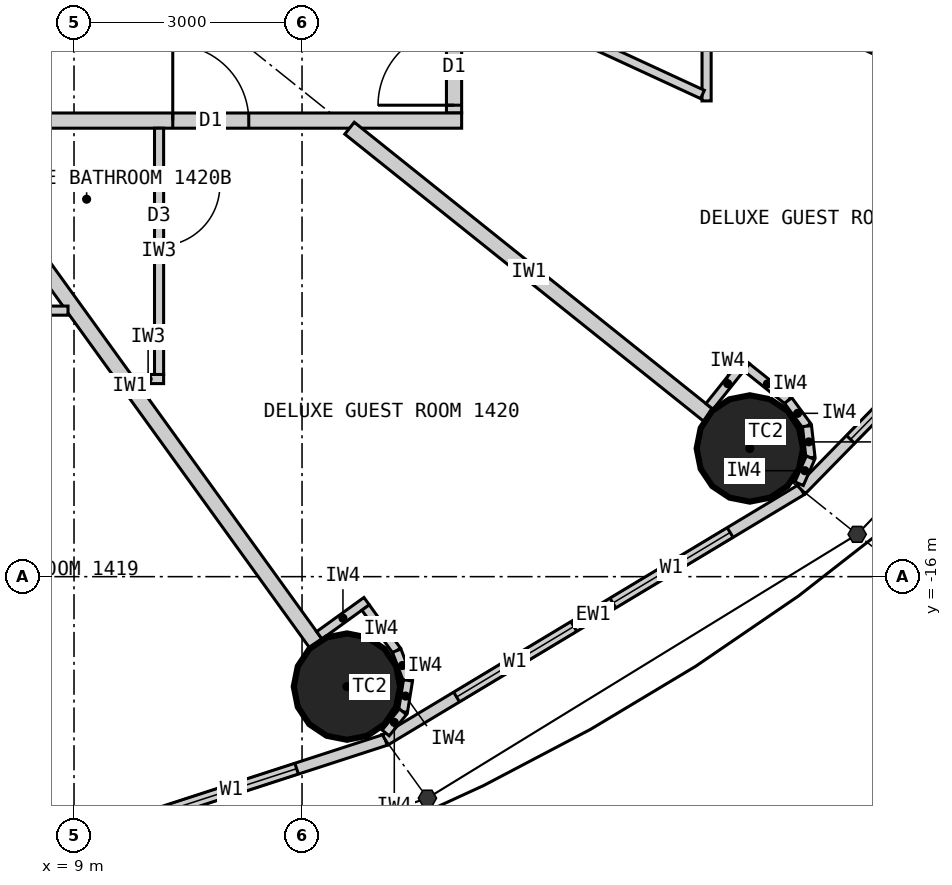
"""IFC4 building model, lengths in metres.
Left out: names, types, materials, properties, quantities, classifications, styles, units other than length and angle.
Written with IfcOpenShell. Run it as: python <this file> out.ifc"""

import sys

from ifc_helpers import new_model, si_unit, direction, frame, frame_2d, origin, origin_2d, place, context, subcontext, project, spatial, rectangle, circle, extrude, element, fill, save


model = new_model("IFC4")
c1 = context("Model", 3, precision=1e-05, world=origin(), true_north=direction((0.0, 1.0)))
c2 = subcontext(c1, "Body", "Model", "MODEL_VIEW")
j1 = project(units=[si_unit("LENGTHUNIT", "METRE"), si_unit("PLANEANGLEUNIT", "RADIAN")], contexts=[c1])
p1 = place(None, origin())
s1 = spatial("IfcSite", under=j1, at=p1, CompositionType="ELEMENT")
p2 = place(p1, origin())
s2 = spatial("IfcBuilding", under=s1, at=p2, CompositionType="ELEMENT")
p3 = place(p2, frame((0.0, 0.0, 60.6)))
s3 = spatial("IfcBuildingStorey", under=s2, at=p3, CompositionType="ELEMENT", Elevation=60.6)
for number, where, z_axis, x_axis in (
    (1, (12.591, -17.447, 0.0), (0.0, 0.0, 1.0), (1.0, 0.0, 0.0)),
    (2, (17.892, -14.313, 0.0), (0.0, 0.0, 1.0), (1.0, 0.0, 0.0)),
):
    element("IfcColumn", number, at=place(p3, frame(where, z_axis=z_axis, x_axis=x_axis)), inside=s3, PredefinedType="COLUMN", context=c2, shape_type="SweptSolid", body=[
        extrude(circle(Radius=0.7, at=origin_2d()), origin(), (0.0, 0.0, 1.0), 3.3),
    ])
p4 = place(p3, frame((6.766, -20.202, 0.0), z_axis=(0.0, 0.0, 1.0), x_axis=(0.951137534625, 0.308767534285, 0.0)))
e3 = element("IfcWall", 3, at=p4, inside=s3, PredefinedType="ELEMENTEDWALL", context=c2, shape_type="SweptSolid", body=[
    extrude(rectangle(XDim=6.655, YDim=0.15, at=frame_2d((3.328, 0.0))), origin(), (0.0, 0.0, 1.0), 3.12),
])
p5 = place(p4, frame((1.228, 0.0, 0.9)))
e4 = element("IfcOpeningElement", 4, at=p5, cuts=e3, PredefinedType="OPENING", context=c2, shape_type="SweptSolid", body=[
    extrude(rectangle(XDim=1.8, YDim=1.9, at=frame_2d((0.9, 0.95))), frame((0.0, 0.085, 0.0), z_axis=(0.0, -1.0, 0.0), x_axis=(1.0, 0.0, 0.0)), (0.0, 0.0, 1.0), 0.17),
])
p6 = place(p4, frame((3.628, 0.0, 0.9)))
e5 = element("IfcOpeningElement", 5, at=p6, cuts=e3, PredefinedType="OPENING", context=c2, shape_type="SweptSolid", body=[
    extrude(rectangle(XDim=1.8, YDim=1.9, at=frame_2d((0.9, 0.95))), frame((0.0, 0.085, 0.0), z_axis=(0.0, -1.0, 0.0), x_axis=(1.0, 0.0, 0.0)), (0.0, 0.0, 1.0), 0.17),
])
p7 = place(p3, frame((13.096, -18.147, 0.0), z_axis=(0.0, 0.0, 1.0), x_axis=(0.856983180864, 0.515344377787, 0.0)))
e6 = element("IfcWall", 6, at=p7, inside=s3, PredefinedType="ELEMENTEDWALL", context=c2, shape_type="SweptSolid", body=[
    extrude(rectangle(XDim=6.386, YDim=0.15, at=frame_2d((3.193, 0.0))), origin(), (0.0, 0.0, 1.0), 3.12),
])
p8 = place(p7, frame((1.093, 0.0, 0.9)))
e7 = element("IfcOpeningElement", 7, at=p8, cuts=e6, PredefinedType="OPENING", context=c2, shape_type="SweptSolid", body=[
    extrude(rectangle(XDim=1.8, YDim=1.9, at=frame_2d((0.9, 0.95))), frame((0.0, 0.085, 0.0), z_axis=(0.0, -1.0, 0.0), x_axis=(1.0, 0.0, 0.0)), (0.0, 0.0, 1.0), 0.17),
])
p9 = place(p7, frame((3.493, 0.0, 0.9)))
e8 = element("IfcOpeningElement", 8, at=p9, cuts=e6, PredefinedType="OPENING", context=c2, shape_type="SweptSolid", body=[
    extrude(rectangle(XDim=1.8, YDim=1.9, at=frame_2d((0.9, 0.95))), frame((0.0, 0.085, 0.0), z_axis=(0.0, -1.0, 0.0), x_axis=(1.0, 0.0, 0.0)), (0.0, 0.0, 1.0), 0.17),
])
p10 = place(p3, frame((18.57, -14.856, 0.0), z_axis=(0.0, 0.0, 1.0), x_axis=(0.699602905915, 0.714531856557, 0.0)))
e9 = element("IfcWall", 9, at=p10, inside=s3, PredefinedType="ELEMENTEDWALL", context=c2, shape_type="SweptSolid", body=[
    extrude(rectangle(XDim=6.051, YDim=0.15, at=frame_2d((3.025, 0.0))), origin(), (0.0, 0.0, 1.0), 3.12),
])
p11 = place(p10, frame((0.926, 0.0, 0.9)))
e10 = element("IfcOpeningElement", 10, at=p11, cuts=e9, PredefinedType="OPENING", context=c2, shape_type="SweptSolid", body=[
    extrude(rectangle(XDim=1.8, YDim=1.9, at=frame_2d((0.9, 0.95))), frame((0.0, 0.085, 0.0), z_axis=(0.0, -1.0, 0.0), x_axis=(1.0, 0.0, 0.0)), (0.0, 0.0, 1.0), 0.17),
])
p12 = place(p10, frame((3.325, 0.0, 0.9)))
e11 = element("IfcOpeningElement", 11, at=p12, cuts=e9, PredefinedType="OPENING", context=c2, shape_type="SweptSolid", body=[
    extrude(rectangle(XDim=1.8, YDim=1.9, at=frame_2d((0.9, 0.95))), frame((0.0, 0.085, 0.0), z_axis=(0.0, -1.0, 0.0), x_axis=(1.0, 0.0, 0.0)), (0.0, 0.0, 1.0), 0.17),
])
p13 = place(p3, frame((14.0, -9.9, 0.0), z_axis=(0.0, 0.0, 1.0), x_axis=(0.0, 1.0, 0.0)))
e12 = element("IfcWall", 12, at=p13, inside=s3, PredefinedType="PARTITIONING", context=c2, shape_type="SweptSolid", body=[
    extrude(rectangle(XDim=19.8, YDim=0.2, at=frame_2d((9.9, 0.0))), origin(), (0.0, 0.0, 1.0), 3.12),
])
p14 = place(p13, frame((0.103, 0.0, 0.0)))
e13 = element("IfcOpeningElement", 13, at=p14, cuts=e12, PredefinedType="OPENING", context=c2, shape_type="SweptSolid", body=[
    extrude(rectangle(XDim=1.0, YDim=2.2, at=frame_2d((0.5, 1.1))), frame((0.0, 0.11, 0.0), z_axis=(0.0, -1.0, 0.0), x_axis=(1.0, 0.0, 0.0)), (0.0, 0.0, 1.0), 0.22),
])
p15 = place(p13, frame((5.248, 0.0, 0.0)))
e14 = element("IfcOpeningElement", 14, at=p15, cuts=e12, PredefinedType="OPENING", context=c2, shape_type="SweptSolid", body=[
    extrude(rectangle(XDim=1.0, YDim=2.2, at=frame_2d((0.5, 1.1))), frame((0.0, 0.11, 0.0), z_axis=(0.0, -1.0, 0.0), x_axis=(1.0, 0.0, 0.0)), (0.0, 0.0, 1.0), 0.22),
])
p16 = place(p13, frame((8.438, 0.0, 0.0)))
e15 = element("IfcOpeningElement", 15, at=p16, cuts=e12, PredefinedType="OPENING", context=c2, shape_type="SweptSolid", body=[
    extrude(rectangle(XDim=1.0, YDim=2.2, at=frame_2d((0.5, 1.1))), frame((0.0, 0.11, 0.0), z_axis=(0.0, -1.0, 0.0), x_axis=(1.0, 0.0, 0.0)), (0.0, 0.0, 1.0), 0.22),
])
p17 = place(p13, frame((14.532, 0.0, 0.0)))
e16 = element("IfcOpeningElement", 16, at=p17, cuts=e12, PredefinedType="OPENING", context=c2, shape_type="SweptSolid", body=[
    extrude(rectangle(XDim=1.0, YDim=2.2, at=frame_2d((0.5, 1.1))), frame((0.0, 0.11, 0.0), z_axis=(0.0, -1.0, 0.0), x_axis=(1.0, 0.0, 0.0)), (0.0, 0.0, 1.0), 0.22),
])
p18 = place(p3, frame((14.1, -10.0, 0.0), z_axis=(0.0, 0.0, 1.0), x_axis=(-1.0, 0.0, 0.0)))
e17 = element("IfcWall", 17, at=p18, inside=s3, PredefinedType="PARTITIONING", context=c2, shape_type="SweptSolid", body=[
    extrude(rectangle(XDim=28.2, YDim=0.2, at=frame_2d((14.1, 0.0))), origin(), (0.0, 0.0, 1.0), 3.12),
])
p19 = place(p18, frame((23.865, 0.0, 0.0)))
e18 = element("IfcOpeningElement", 18, at=p19, cuts=e17, PredefinedType="OPENING", context=c2, shape_type="SweptSolid", body=[
    extrude(rectangle(XDim=1.0, YDim=2.2, at=frame_2d((0.5, 1.1))), frame((0.0, 0.11, 0.0), z_axis=(0.0, -1.0, 0.0), x_axis=(1.0, 0.0, 0.0)), (0.0, 0.0, 1.0), 0.22),
])
p20 = place(p18, frame((18.529, 0.0, 0.0)))
e19 = element("IfcOpeningElement", 19, at=p20, cuts=e17, PredefinedType="OPENING", context=c2, shape_type="SweptSolid", body=[
    extrude(rectangle(XDim=1.0, YDim=2.2, at=frame_2d((0.5, 1.1))), frame((0.0, 0.11, 0.0), z_axis=(0.0, -1.0, 0.0), x_axis=(1.0, 0.0, 0.0)), (0.0, 0.0, 1.0), 0.22),
])
p21 = place(p18, frame((14.623, 0.0, 0.0)))
e20 = element("IfcOpeningElement", 20, at=p21, cuts=e17, PredefinedType="OPENING", context=c2, shape_type="SweptSolid", body=[
    extrude(rectangle(XDim=1.0, YDim=2.2, at=frame_2d((0.5, 1.1))), frame((0.0, 0.11, 0.0), z_axis=(0.0, -1.0, 0.0), x_axis=(1.0, 0.0, 0.0)), (0.0, 0.0, 1.0), 0.22),
])
p22 = place(p18, frame((11.24, 0.0, 0.0)))
e21 = element("IfcOpeningElement", 21, at=p22, cuts=e17, PredefinedType="OPENING", context=c2, shape_type="SweptSolid", body=[
    extrude(rectangle(XDim=1.0, YDim=2.2, at=frame_2d((0.5, 1.1))), frame((0.0, 0.11, 0.0), z_axis=(0.0, -1.0, 0.0), x_axis=(1.0, 0.0, 0.0)), (0.0, 0.0, 1.0), 0.22),
])
p23 = place(p18, frame((8.671, 0.0, 0.0)))
e22 = element("IfcOpeningElement", 22, at=p23, cuts=e17, PredefinedType="OPENING", context=c2, shape_type="SweptSolid", body=[
    extrude(rectangle(XDim=1.0, YDim=2.2, at=frame_2d((0.5, 1.1))), frame((0.0, 0.11, 0.0), z_axis=(0.0, -1.0, 0.0), x_axis=(1.0, 0.0, 0.0)), (0.0, 0.0, 1.0), 0.22),
])
p24 = place(p18, frame((2.801, 0.0, 0.0)))
e23 = element("IfcOpeningElement", 23, at=p24, cuts=e17, PredefinedType="OPENING", context=c2, shape_type="SweptSolid", body=[
    extrude(rectangle(XDim=1.0, YDim=2.2, at=frame_2d((0.5, 1.1))), frame((0.0, 0.11, 0.0), z_axis=(0.0, -1.0, 0.0), x_axis=(1.0, 0.0, 0.0)), (0.0, 0.0, 1.0), 0.22),
])
p25 = place(p3, frame((7.289, -10.1, 0.0), z_axis=(0.0, 0.0, 1.0), x_axis=(0.585198353053, -0.810890182197, 0.0)))
e24 = element("IfcWall", 24, at=p25, inside=s3, PredefinedType="PARTITIONING", context=c2, shape_type="SweptSolid", body=[
    extrude(rectangle(XDim=8.36, YDim=0.2, at=frame_2d((4.18, 0.0))), origin(), (0.0, 0.0, 1.0), 2.32),
])
p26 = place(p3, frame((12.625, -10.1, 0.0), z_axis=(0.0, 0.0, 1.0), x_axis=(0.780892451574, -0.624665493744, 0.0)))
e25 = element("IfcWall", 25, at=p26, inside=s3, PredefinedType="PARTITIONING", context=c2, shape_type="SweptSolid", body=[
    extrude(rectangle(XDim=6.045, YDim=0.2, at=frame_2d((3.022, 0.0))), origin(), (0.0, 0.0, 1.0), 2.32),
])
p27 = place(p3, frame((14.1, -6.512, 0.0), z_axis=(0.0, 0.0, 1.0), x_axis=(0.907832871056, -0.419332181247, 0.0)))
e26 = element("IfcWall", 26, at=p27, inside=s3, PredefinedType="PARTITIONING", context=c2, shape_type="SweptSolid", body=[
    extrude(rectangle(XDim=8.023, YDim=0.2, at=frame_2d((4.011, 0.0))), origin(), (0.0, 0.0, 1.0), 2.32),
])
p28 = place(p3, frame((17.323, -8.101, 0.0), z_axis=(0.0, 0.0, 1.0), x_axis=(0.0, -1.0, 0.0)))
e27 = element("IfcWall", 27, at=p28, inside=s3, PredefinedType="PARTITIONING", context=c2, shape_type="SweptSolid", body=[
    extrude(rectangle(XDim=1.64, YDim=0.12, at=frame_2d((0.82, 0.0))), origin(), (0.0, 0.0, 1.0), 3.12),
])
p29 = place(p3, frame((14.1, -8.193, 0.0), z_axis=(0.0, 0.0, 1.0), x_axis=(0.907836493557, -0.419324338628, 0.0)))
e28 = element("IfcWall", 28, at=p29, inside=s3, PredefinedType="PARTITIONING", context=c2, shape_type="SweptSolid", body=[
    extrude(rectangle(XDim=3.49, YDim=0.12, at=frame_2d((1.745, 0.0))), origin(), (0.0, 0.0, 1.0), 3.12),
])
p30 = place(p29, frame((0.75, 0.0, 0.0)))
e29 = element("IfcOpeningElement", 29, at=p30, cuts=e28, PredefinedType="OPENING", context=c2, shape_type="SweptSolid", body=[
    extrude(rectangle(XDim=0.8, YDim=2.1, at=frame_2d((0.4, 1.05))), frame((0.0, 0.07, 0.0), z_axis=(0.0, -1.0, 0.0), x_axis=(1.0, 0.0, 0.0)), (0.0, 0.0, 1.0), 0.14),
])
p31 = place(p3, frame((8.921, -12.5, 0.0), z_axis=(0.0, 0.0, 1.0), x_axis=(-1.0, 0.0, 0.0)))
e30 = element("IfcWall", 30, at=p31, inside=s3, PredefinedType="PARTITIONING", context=c2, shape_type="SweptSolid", body=[
    extrude(rectangle(XDim=3.372, YDim=0.12, at=frame_2d((1.686, 0.0))), origin(), (0.0, 0.0, 1.0), 3.12),
])
p32 = place(p3, frame((9.771, -13.4, 0.0), z_axis=(0.0, 0.0, 1.0), x_axis=(1.0, 0.0, 0.0)))
e31 = element("IfcWall", 31, at=p32, inside=s3, PredefinedType="PARTITIONING", context=c2, shape_type="SweptSolid", body=[
    extrude(rectangle(XDim=0.408, YDim=0.12, at=frame_2d((0.204, 0.0))), origin(), (0.0, 0.0, 1.0), 3.12),
])
p33 = place(p3, frame((10.119, -10.1, 0.0), z_axis=(0.0, 0.0, 1.0), x_axis=(0.0, -1.0, 0.0)))
e32 = element("IfcWall", 32, at=p33, inside=s3, PredefinedType="PARTITIONING", context=c2, shape_type="SweptSolid", body=[
    extrude(rectangle(XDim=3.24, YDim=0.12, at=frame_2d((1.62, 0.0))), origin(), (0.0, 0.0, 1.0), 3.12),
])
p34 = place(p33, frame((0.75, 0.0, 0.0)))
e33 = element("IfcOpeningElement", 33, at=p34, cuts=e32, PredefinedType="OPENING", context=c2, shape_type="SweptSolid", body=[
    extrude(rectangle(XDim=0.8, YDim=2.1, at=frame_2d((0.4, 1.05))), frame((0.0, 0.07, 0.0), z_axis=(0.0, -1.0, 0.0), x_axis=(1.0, 0.0, 0.0)), (0.0, 0.0, 1.0), 0.14),
])
p35 = place(p3, frame((12.227, -16.772, 0.0), z_axis=(0.0, 0.0, 1.0), x_axis=(0.810821798253, 0.585293098778, 0.0)))
e34 = element("IfcWall", 34, at=p35, inside=s3, PredefinedType="PARTITIONING", context=c2, shape_type="SweptSolid", body=[
    extrude(rectangle(XDim=0.768, YDim=0.12, at=frame_2d((0.384, 0.0))), origin(), (0.0, 0.0, 1.0), 3.12),
])
p36 = place(p3, frame((12.836, -16.406, 0.0), z_axis=(0.0, 0.0, 1.0), x_axis=(0.585223113993, -0.810872312296, 0.0)))
e35 = element("IfcWall", 35, at=p36, inside=s3, PredefinedType="PARTITIONING", context=c2, shape_type="SweptSolid", body=[
    extrude(rectangle(XDim=0.7, YDim=0.12, at=frame_2d((0.35, 0.0))), origin(), (0.0, 0.0, 1.0), 3.12),
])
p37 = place(p3, frame((13.246, -16.974, 0.0), z_axis=(0.0, 0.0, 1.0), x_axis=(0.355728122235, -0.934589483705, 0.0)))
e36 = element("IfcWall", 36, at=p37, inside=s3, PredefinedType="PARTITIONING", context=c2, shape_type="SweptSolid", body=[
    extrude(rectangle(XDim=0.418, YDim=0.12, at=frame_2d((0.209, 0.0))), origin(), (0.0, 0.0, 1.0), 3.12),
])
p38 = place(p3, frame((13.394, -17.365, 0.0), z_axis=(0.0, 0.0, 1.0), x_axis=(-0.159379276926, -0.987217425943, 0.0)))
e37 = element("IfcWall", 37, at=p38, inside=s3, PredefinedType="PARTITIONING", context=c2, shape_type="SweptSolid", body=[
    extrude(rectangle(XDim=0.418, YDim=0.12, at=frame_2d((0.209, 0.0))), origin(), (0.0, 0.0, 1.0), 3.12),
])
p39 = place(p3, frame((13.328, -17.777, 0.0), z_axis=(0.0, 0.0, 1.0), x_axis=(-0.632276783541, -0.774742582407, 0.0)))
e38 = element("IfcWall", 38, at=p39, inside=s3, PredefinedType="PARTITIONING", context=c2, shape_type="SweptSolid", body=[
    extrude(rectangle(XDim=0.36, YDim=0.12, at=frame_2d((0.18, 0.0))), origin(), (0.0, 0.0, 1.0), 3.12),
])
p40 = place(p3, frame((17.361, -13.76, 0.0), z_axis=(0.0, 0.0, 1.0), x_axis=(0.624501042889, 0.781023973659, 0.0)))
e39 = element("IfcWall", 39, at=p40, inside=s3, PredefinedType="PARTITIONING", context=c2, shape_type="SweptSolid", body=[
    extrude(rectangle(XDim=0.767, YDim=0.12, at=frame_2d((0.384, 0.0))), origin(), (0.0, 0.0, 1.0), 3.12),
])
p41 = place(p3, frame((17.85, -13.246, 0.0), z_axis=(0.0, 0.0, 1.0), x_axis=(0.780902834923, -0.62465251333, 0.0)))
e40 = element("IfcWall", 40, at=p41, inside=s3, PredefinedType="PARTITIONING", context=c2, shape_type="SweptSolid", body=[
    extrude(rectangle(XDim=0.7, YDim=0.12, at=frame_2d((0.35, 0.0))), origin(), (0.0, 0.0, 1.0), 3.12),
])
for number, where, z_axis, x_axis in (
    (41, (18.396, -13.683, 0.0), (0.0, 0.0, 1.0), (0.592, -0.806, 0.0)),
    (42, (18.644, -14.02, 0.0), (0.0, 0.0, 1.0), (0.11, -0.994, 0.0)),
):
    element("IfcWall", number, at=place(p3, frame(where, z_axis=z_axis, x_axis=x_axis)), inside=s3, PredefinedType="PARTITIONING", context=c2, shape_type="SweptSolid", body=[
        extrude(rectangle(XDim=0.418, YDim=0.12, at=frame_2d((0.209, 0.0))), origin(), (0.0, 0.0, 1.0), 3.12),
    ])
p42 = place(p3, frame((18.69, -14.435, 0.0), z_axis=(0.0, 0.0, 1.0), x_axis=(-0.401093412634, -0.91603715773, 0.0)))
e43 = element("IfcWall", 43, at=p42, inside=s3, PredefinedType="PARTITIONING", context=c2, shape_type="SweptSolid", body=[
    extrude(rectangle(XDim=0.373, YDim=0.12, at=frame_2d((0.187, 0.0))), origin(), (0.0, 0.0, 1.0), 3.12),
])
p43 = place(p6, origin())
e44 = element("IfcWindow", 44, at=p43, inside=s3, PartitioningType="SINGLE_PANEL", PredefinedType="WINDOW", context=c2, shape_type="SweptSolid", body=[
    extrude(rectangle(XDim=1.8, YDim=1.9, at=frame_2d((0.9, 0.95))), frame((0.0, 0.03, 0.0), z_axis=(0.0, -1.0, 0.0), x_axis=(1.0, 0.0, 0.0)), (0.0, 0.0, 1.0), 0.06),
])
fill(e5, e44)
p44 = place(p8, origin())
e45 = element("IfcWindow", 45, at=p44, inside=s3, PartitioningType="SINGLE_PANEL", PredefinedType="WINDOW", context=c2, shape_type="SweptSolid", body=[
    extrude(rectangle(XDim=1.8, YDim=1.9, at=frame_2d((0.9, 0.95))), frame((0.0, 0.03, 0.0), z_axis=(0.0, -1.0, 0.0), x_axis=(1.0, 0.0, 0.0)), (0.0, 0.0, 1.0), 0.06),
])
fill(e7, e45)
p45 = place(p9, origin())
e46 = element("IfcWindow", 46, at=p45, inside=s3, PartitioningType="SINGLE_PANEL", PredefinedType="WINDOW", context=c2, shape_type="SweptSolid", body=[
    extrude(rectangle(XDim=1.8, YDim=1.9, at=frame_2d((0.9, 0.95))), frame((0.0, 0.03, 0.0), z_axis=(0.0, -1.0, 0.0), x_axis=(1.0, 0.0, 0.0)), (0.0, 0.0, 1.0), 0.06),
])
fill(e8, e46)
p46 = place(p11, origin())
e47 = element("IfcWindow", 47, at=p46, inside=s3, PartitioningType="SINGLE_PANEL", PredefinedType="WINDOW", context=c2, shape_type="SweptSolid", body=[
    extrude(rectangle(XDim=1.8, YDim=1.9, at=frame_2d((0.9, 0.95))), frame((0.0, 0.03, 0.0), z_axis=(0.0, -1.0, 0.0), x_axis=(1.0, 0.0, 0.0)), (0.0, 0.0, 1.0), 0.06),
])
fill(e10, e47)
p47 = place(p14, origin())
e48 = element("IfcDoor", 48, at=p47, inside=s3, OperationType="SINGLE_SWING_LEFT", PredefinedType="DOOR", context=c2, shape_type="SweptSolid", body=[
    extrude(rectangle(XDim=1.0, YDim=2.2, at=frame_2d((0.5, 1.1))), frame((0.0, 0.025, 0.0), z_axis=(0.0, -1.0, 0.0), x_axis=(1.0, 0.0, 0.0)), (0.0, 0.0, 1.0), 0.05),
])
fill(e13, e48)
p48 = place(p34, origin())
e49 = element("IfcDoor", 49, at=p48, inside=s3, OperationType="SINGLE_SWING_LEFT", PredefinedType="DOOR", context=c2, shape_type="SweptSolid", body=[
    extrude(rectangle(XDim=0.8, YDim=2.1, at=frame_2d((0.4, 1.05))), frame((0.0, 0.025, 0.0), z_axis=(0.0, -1.0, 0.0), x_axis=(1.0, 0.0, 0.0)), (0.0, 0.0, 1.0), 0.05),
])
fill(e33, e49)
p49 = place(p24, origin())
e50 = element("IfcDoor", 50, at=p49, inside=s3, OperationType="SINGLE_SWING_RIGHT", PredefinedType="DOOR", context=c2, shape_type="SweptSolid", body=[
    extrude(rectangle(XDim=1.0, YDim=2.2, at=frame_2d((0.5, 1.1))), frame((0.0, 0.025, 0.0), z_axis=(0.0, -1.0, 0.0), x_axis=(1.0, 0.0, 0.0)), (0.0, 0.0, 1.0), 0.05),
])
fill(e23, e50)
save(model, sys.argv[1])
